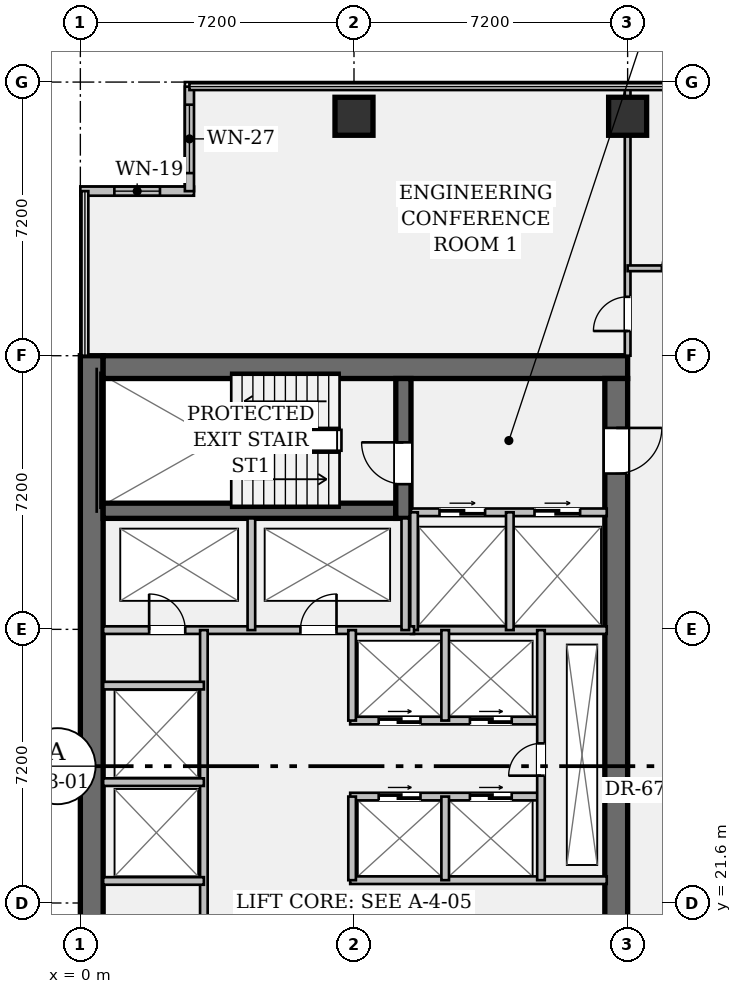
"""IFC4 building model, lengths in metres.
Left out: names, types, materials, properties, quantities, classifications, styles, units other than length and angle.
Written with IfcOpenShell. Run it as: python <this file> out.ifc"""

import sys

from ifc_helpers import new_model, si_unit, direction, frame, frame_2d, origin, origin_2d, place, context, subcontext, project, spatial, rectangle, hollow_rectangle, extrude, element, fill, save


model = new_model("IFC4")
c1 = context("Model", 3, precision=1e-05, world=origin(), true_north=direction((0.0, 1.0)))
c2 = subcontext(c1, "Body", "Model", "MODEL_VIEW")
j1 = project(units=[si_unit("LENGTHUNIT", "METRE"), si_unit("PLANEANGLEUNIT", "RADIAN")], contexts=[c1])
p1 = place(None, origin())
s1 = spatial("IfcSite", under=j1, at=p1, CompositionType="ELEMENT")
p2 = place(p1, origin())
s2 = spatial("IfcBuilding", under=s1, at=p2, CompositionType="ELEMENT")
p3 = place(p2, frame((0.0, 0.0, 73.5)))
s3 = spatial("IfcBuildingStorey", under=s2, at=p3, CompositionType="ELEMENT", Elevation=73.5)
p4 = place(p3, frame((0.3, 7.2, 0.0), z_axis=(0.0, 0.0, 1.0), x_axis=(0.0, 1.0, 0.0)))
e1 = element("IfcWall", 1, at=p4, inside=s3, PredefinedType="SHEAR", context=c2, shape_type="SweptSolid", body=[
    extrude(rectangle(XDim=28.8, YDim=0.6, at=frame_2d((14.4, 0.0))), origin(), (0.0, 0.0, 1.0), 3.57),
])
p5 = place(p3, frame((0.6, 35.7, 0.0), z_axis=(0.0, 0.0, 1.0), x_axis=(1.0, 0.0, 0.0)))
e2 = element("IfcWall", 2, at=p5, inside=s3, PredefinedType="SHEAR", context=c2, shape_type="SweptSolid", body=[
    extrude(rectangle(XDim=13.8, YDim=0.6, at=frame_2d((6.9, 0.0))), origin(), (0.0, 0.0, 1.0), 3.57),
])
p6 = place(p3, frame((14.1, 35.4, 0.0), z_axis=(0.0, 0.0, 1.0), x_axis=(0.0, -1.0, 0.0)))
e3 = element("IfcWall", 3, at=p6, inside=s3, PredefinedType="SHEAR", context=c2, shape_type="SweptSolid", body=[
    extrude(rectangle(XDim=27.6, YDim=0.6, at=frame_2d((13.8, 0.0))), origin(), (0.0, 0.0, 1.0), 3.57),
])
p7 = place(p6, frame((1.3, 0.0, 0.0)))
e4 = element("IfcOpeningElement", 4, at=p7, cuts=e3, PredefinedType="OPENING", context=c2, shape_type="SweptSolid", body=[
    extrude(rectangle(XDim=1.2, YDim=2.15, at=frame_2d((0.6, 1.075))), frame((0.0, 0.312, 0.0), z_axis=(0.0, -1.0, 0.0), x_axis=(1.0, 0.0, 0.0)), (0.0, 0.0, 1.0), 0.624),
])
p8 = place(p6, frame((25.25, 0.0, 0.0)))
e5 = element("IfcOpeningElement", 5, at=p8, cuts=e3, PredefinedType="OPENING", context=c2, shape_type="SweptSolid", body=[
    extrude(rectangle(XDim=1.2, YDim=2.15, at=frame_2d((0.6, 1.075))), frame((0.0, 0.312, 0.0), z_axis=(0.0, -1.0, 0.0), x_axis=(1.0, 0.0, 0.0)), (0.0, 0.0, 1.0), 0.624),
])
p9 = place(p6, frame((14.6, 0.0, 0.0)))
e6 = element("IfcOpeningElement", 6, at=p9, cuts=e3, PredefinedType="OPENING", context=c2, shape_type="SweptSolid", body=[
    extrude(rectangle(XDim=1.6, YDim=2.2, at=frame_2d((0.8, 1.1))), frame((0.0, 0.312, 0.0), z_axis=(0.0, -1.0, 0.0), x_axis=(1.0, 0.0, 0.0)), (0.0, 0.0, 1.0), 0.624),
])
p10 = place(p3, frame((0.6, 31.92, 0.0), z_axis=(0.0, 0.0, 1.0), x_axis=(1.0, 0.0, 0.0)))
e7 = element("IfcWall", 7, at=p10, inside=s3, PredefinedType="SHEAR", context=c2, shape_type="SweptSolid", body=[
    extrude(rectangle(XDim=7.7, YDim=0.4, at=frame_2d((3.85, 0.0))), origin(), (0.0, 0.0, 1.0), 3.57),
])
p11 = place(p3, frame((8.5, 31.72, 0.0), z_axis=(0.0, 0.0, 1.0), x_axis=(0.0, 1.0, 0.0)))
e8 = element("IfcWall", 8, at=p11, inside=s3, PredefinedType="SHEAR", context=c2, shape_type="SweptSolid", body=[
    extrude(rectangle(XDim=3.68, YDim=0.4, at=frame_2d((1.84, 0.0))), origin(), (0.0, 0.0, 1.0), 3.57),
])
p12 = place(p11, frame((0.9, 0.0, 0.0)))
e9 = element("IfcOpeningElement", 9, at=p12, cuts=e8, PredefinedType="OPENING", context=c2, shape_type="SweptSolid", body=[
    extrude(rectangle(XDim=1.1, YDim=2.15, at=frame_2d((0.55, 1.075))), frame((0.0, 0.212, 0.0), z_axis=(0.0, -1.0, 0.0), x_axis=(1.0, 0.0, 0.0)), (0.0, 0.0, 1.0), 0.424),
])
for number, where, z_axis, x_axis in (
    (10, (7.2, 42.3, 0.0), (0.0, 0.0, 1.0), (1.0, 0.0, 0.0)),
    (11, (14.4, 42.3, 0.0), (0.0, 0.0, 1.0), (1.0, 0.0, 0.0)),
):
    element("IfcColumn", number, at=place(p3, frame(where, z_axis=z_axis, x_axis=x_axis)), inside=s3, PredefinedType="COLUMN", context=c2, shape_type="SweptSolid", body=[
        extrude(hollow_rectangle(XDim=1.0, YDim=1.0, WallThickness=0.065, at=origin_2d()), origin(), (0.0, 0.0, 1.0), 3.57),
    ])
p13 = place(p3, frame((0.0, 40.33, 0.0), z_axis=(0.0, 0.0, 1.0), x_axis=(1.0, 0.0, 0.0)))
e12 = element("IfcWall", 12, at=p13, inside=s3, PredefinedType="STANDARD", context=c2, shape_type="SweptSolid", body=[
    extrude(rectangle(XDim=2.99, YDim=0.24, at=frame_2d((1.495, 0.0))), origin(), (0.0, 0.0, 1.0), 3.57),
])
p14 = place(p13, frame((0.895, 0.0, 0.95)))
e13 = element("IfcOpeningElement", 13, at=p14, cuts=e12, PredefinedType="OPENING", context=c2, shape_type="SweptSolid", body=[
    extrude(rectangle(XDim=1.2, YDim=1.8, at=frame_2d((0.6, 0.9))), frame((0.0, 0.132, 0.0), z_axis=(0.0, -1.0, 0.0), x_axis=(1.0, 0.0, 0.0)), (0.0, 0.0, 1.0), 0.264),
])
p15 = place(p3, frame((2.87, 40.33, 0.0), z_axis=(0.0, 0.0, 1.0), x_axis=(0.0, 1.0, 0.0)))
e14 = element("IfcWall", 14, at=p15, inside=s3, PredefinedType="STANDARD", context=c2, shape_type="SweptSolid", body=[
    extrude(rectangle(XDim=2.75, YDim=0.24, at=frame_2d((1.375, 0.0))), origin(), (0.0, 0.0, 1.0), 3.57),
])
p16 = place(p15, frame((0.475, 0.0, 0.95)))
e15 = element("IfcOpeningElement", 15, at=p16, cuts=e14, PredefinedType="OPENING", context=c2, shape_type="SweptSolid", body=[
    extrude(rectangle(XDim=1.8, YDim=1.35, at=frame_2d((0.9, 0.675))), frame((0.0, 0.132, 0.0), z_axis=(0.0, -1.0, 0.0), x_axis=(1.0, 0.0, 0.0)), (0.0, 0.0, 1.0), 0.264),
])
p17 = place(p3, frame((8.7, 31.88, 0.0), z_axis=(0.0, 0.0, 1.0), x_axis=(1.0, 0.0, 0.0)))
e16 = element("IfcWall", 16, at=p17, inside=s3, PredefinedType="PARTITIONING", context=c2, shape_type="SweptSolid", body=[
    extrude(rectangle(XDim=5.15, YDim=0.2, at=frame_2d((2.575, 0.0))), origin(), (0.0, 0.0, 1.0), 3.57),
])
p18 = place(p17, frame((0.75, 0.0, 0.0)))
e17 = element("IfcOpeningElement", 17, at=p18, cuts=e16, PredefinedType="OPENING", context=c2, shape_type="SweptSolid", body=[
    extrude(rectangle(XDim=1.2, YDim=2.2, at=frame_2d((0.6, 1.1))), frame((0.0, 0.112, 0.0), z_axis=(0.0, -1.0, 0.0), x_axis=(1.0, 0.0, 0.0)), (0.0, 0.0, 1.0), 0.224),
])
p19 = place(p17, frame((3.25, 0.0, 0.0)))
e18 = element("IfcOpeningElement", 18, at=p19, cuts=e16, PredefinedType="OPENING", context=c2, shape_type="SweptSolid", body=[
    extrude(rectangle(XDim=1.2, YDim=2.2, at=frame_2d((0.6, 1.1))), frame((0.0, 0.112, 0.0), z_axis=(0.0, -1.0, 0.0), x_axis=(1.0, 0.0, 0.0)), (0.0, 0.0, 1.0), 0.224),
])
p20 = place(p3, frame((8.7, 28.78, 0.0), z_axis=(0.0, 0.0, 1.0), x_axis=(1.0, 0.0, 0.0)))
e19 = element("IfcWall", 19, at=p20, inside=s3, PredefinedType="PARTITIONING", context=c2, shape_type="SweptSolid", body=[
    extrude(rectangle(XDim=5.15, YDim=0.2, at=frame_2d((2.575, 0.0))), origin(), (0.0, 0.0, 1.0), 3.57),
])
for number, where, z_axis, x_axis in (
    (20, (8.78, 28.78, 0.0), (0.0, 0.0, 1.0), (0.0, 1.0, 0.0)),
    (21, (11.3, 28.78, 0.0), (0.0, 0.0, 1.0), (0.0, 1.0, 0.0)),
):
    element("IfcWall", number, at=place(p3, frame(where, z_axis=z_axis, x_axis=x_axis)), inside=s3, PredefinedType="PARTITIONING", context=c2, shape_type="SweptSolid", body=[
        extrude(rectangle(XDim=3.1, YDim=0.2, at=frame_2d((1.55, 0.0))), origin(), (0.0, 0.0, 1.0), 3.57),
    ])
p21 = place(p3, frame((0.6, 28.78, 0.0), z_axis=(0.0, 0.0, 1.0), x_axis=(1.0, 0.0, 0.0)))
e22 = element("IfcWall", 22, at=p21, inside=s3, PredefinedType="PARTITIONING", context=c2, shape_type="SweptSolid", body=[
    extrude(rectangle(XDim=8.18, YDim=0.2, at=frame_2d((4.09, 0.0))), origin(), (0.0, 0.0, 1.0), 3.57),
])
p22 = place(p21, frame((1.21, 0.0, 0.0)))
e23 = element("IfcOpeningElement", 23, at=p22, cuts=e22, PredefinedType="OPENING", context=c2, shape_type="SweptSolid", body=[
    extrude(rectangle(XDim=0.95, YDim=2.15, at=frame_2d((0.475, 1.075))), frame((0.0, 0.112, 0.0), z_axis=(0.0, -1.0, 0.0), x_axis=(1.0, 0.0, 0.0)), (0.0, 0.0, 1.0), 0.224),
])
p23 = place(p21, frame((5.19, 0.0, 0.0)))
e24 = element("IfcOpeningElement", 24, at=p23, cuts=e22, PredefinedType="OPENING", context=c2, shape_type="SweptSolid", body=[
    extrude(rectangle(XDim=0.95, YDim=2.15, at=frame_2d((0.475, 1.075))), frame((0.0, 0.112, 0.0), z_axis=(0.0, -1.0, 0.0), x_axis=(1.0, 0.0, 0.0)), (0.0, 0.0, 1.0), 0.224),
])
for number, where, z_axis, x_axis in (
    (25, (4.5, 28.78, 0.0), (0.0, 0.0, 1.0), (0.0, 1.0, 0.0)),
    (26, (8.55, 28.78, 0.0), (0.0, 0.0, 1.0), (0.0, 1.0, 0.0)),
):
    element("IfcWall", number, at=place(p3, frame(where, z_axis=z_axis, x_axis=x_axis)), inside=s3, PredefinedType="PARTITIONING", context=c2, shape_type="SweptSolid", body=[
        extrude(rectangle(XDim=2.94, YDim=0.2, at=frame_2d((1.47, 0.0))), origin(), (0.0, 0.0, 1.0), 3.57),
    ])
p24 = place(p3, frame((3.25, 15.7, 0.0), z_axis=(0.0, 0.0, 1.0), x_axis=(0.0, 1.0, 0.0)))
e27 = element("IfcWall", 27, at=p24, inside=s3, PredefinedType="PARTITIONING", context=c2, shape_type="SweptSolid", body=[
    extrude(rectangle(XDim=13.08, YDim=0.2, at=frame_2d((6.54, 0.0))), origin(), (0.0, 0.0, 1.0), 3.57),
])
for number, where, z_axis, x_axis in (
    (28, (0.6, 22.18, 0.0), (0.0, 0.0, 1.0), (1.0, 0.0, 0.0)),
    (29, (0.6, 24.78, 0.0), (0.0, 0.0, 1.0), (1.0, 0.0, 0.0)),
    (30, (0.6, 27.32, 0.0), (0.0, 0.0, 1.0), (1.0, 0.0, 0.0)),
):
    element("IfcWall", number, at=place(p3, frame(where, z_axis=z_axis, x_axis=x_axis)), inside=s3, PredefinedType="PARTITIONING", context=c2, shape_type="SweptSolid", body=[
        extrude(rectangle(XDim=2.65, YDim=0.2, at=frame_2d((1.325, 0.0))), origin(), (0.0, 0.0, 1.0), 3.57),
    ])
p25 = place(p3, frame((7.1, 22.2, 0.0), z_axis=(0.0, 0.0, 1.0), x_axis=(1.0, 0.0, 0.0)))
e31 = element("IfcWall", 31, at=p25, inside=s3, PredefinedType="PARTITIONING", context=c2, shape_type="SweptSolid", body=[
    extrude(rectangle(XDim=6.75, YDim=0.2, at=frame_2d((3.375, 0.0))), origin(), (0.0, 0.0, 1.0), 3.57),
])
p26 = place(p3, frame((7.1, 24.4, 0.0), z_axis=(0.0, 0.0, 1.0), x_axis=(1.0, 0.0, 0.0)))
e32 = element("IfcWall", 32, at=p26, inside=s3, PredefinedType="PARTITIONING", context=c2, shape_type="SweptSolid", body=[
    extrude(rectangle(XDim=5.02, YDim=0.2, at=frame_2d((2.51, 0.0))), origin(), (0.0, 0.0, 1.0), 3.57),
])
p27 = place(p26, frame((0.75, 0.0, 0.0)))
e33 = element("IfcOpeningElement", 33, at=p27, cuts=e32, PredefinedType="OPENING", context=c2, shape_type="SweptSolid", body=[
    extrude(rectangle(XDim=1.1, YDim=2.2, at=frame_2d((0.55, 1.1))), frame((0.0, 0.112, 0.0), z_axis=(0.0, -1.0, 0.0), x_axis=(1.0, 0.0, 0.0)), (0.0, 0.0, 1.0), 0.224),
])
p28 = place(p26, frame((3.15, 0.0, 0.0)))
e34 = element("IfcOpeningElement", 34, at=p28, cuts=e32, PredefinedType="OPENING", context=c2, shape_type="SweptSolid", body=[
    extrude(rectangle(XDim=1.1, YDim=2.2, at=frame_2d((0.55, 1.1))), frame((0.0, 0.112, 0.0), z_axis=(0.0, -1.0, 0.0), x_axis=(1.0, 0.0, 0.0)), (0.0, 0.0, 1.0), 0.224),
])
p29 = place(p3, frame((7.1, 26.4, 0.0), z_axis=(0.0, 0.0, 1.0), x_axis=(1.0, 0.0, 0.0)))
e35 = element("IfcWall", 35, at=p29, inside=s3, PredefinedType="PARTITIONING", context=c2, shape_type="SweptSolid", body=[
    extrude(rectangle(XDim=5.02, YDim=0.2, at=frame_2d((2.51, 0.0))), origin(), (0.0, 0.0, 1.0), 3.57),
])
p30 = place(p29, frame((0.75, 0.0, 0.0)))
e36 = element("IfcOpeningElement", 36, at=p30, cuts=e35, PredefinedType="OPENING", context=c2, shape_type="SweptSolid", body=[
    extrude(rectangle(XDim=1.1, YDim=2.2, at=frame_2d((0.55, 1.1))), frame((0.0, 0.112, 0.0), z_axis=(0.0, -1.0, 0.0), x_axis=(1.0, 0.0, 0.0)), (0.0, 0.0, 1.0), 0.224),
])
p31 = place(p29, frame((3.15, 0.0, 0.0)))
e37 = element("IfcOpeningElement", 37, at=p31, cuts=e35, PredefinedType="OPENING", context=c2, shape_type="SweptSolid", body=[
    extrude(rectangle(XDim=1.1, YDim=2.2, at=frame_2d((0.55, 1.1))), frame((0.0, 0.112, 0.0), z_axis=(0.0, -1.0, 0.0), x_axis=(1.0, 0.0, 0.0)), (0.0, 0.0, 1.0), 0.224),
])
p32 = place(p3, frame((7.15, 22.2, 0.0), z_axis=(0.0, 0.0, 1.0), x_axis=(0.0, 1.0, 0.0)))
e38 = element("IfcWall", 38, at=p32, inside=s3, PredefinedType="PARTITIONING", context=c2, shape_type="SweptSolid", body=[
    extrude(rectangle(XDim=2.2, YDim=0.2, at=frame_2d((1.1, 0.0))), origin(), (0.0, 0.0, 1.0), 3.57),
])
p33 = place(p3, frame((7.15, 26.4, 0.0), z_axis=(0.0, 0.0, 1.0), x_axis=(0.0, 1.0, 0.0)))
e39 = element("IfcWall", 39, at=p33, inside=s3, PredefinedType="PARTITIONING", context=c2, shape_type="SweptSolid", body=[
    extrude(rectangle(XDim=2.38, YDim=0.2, at=frame_2d((1.19, 0.0))), origin(), (0.0, 0.0, 1.0), 3.57),
])
p34 = place(p3, frame((9.6, 22.2, 0.0), z_axis=(0.0, 0.0, 1.0), x_axis=(0.0, 1.0, 0.0)))
e40 = element("IfcWall", 40, at=p34, inside=s3, PredefinedType="PARTITIONING", context=c2, shape_type="SweptSolid", body=[
    extrude(rectangle(XDim=2.2, YDim=0.2, at=frame_2d((1.1, 0.0))), origin(), (0.0, 0.0, 1.0), 3.57),
])
p35 = place(p3, frame((9.6, 26.4, 0.0), z_axis=(0.0, 0.0, 1.0), x_axis=(0.0, 1.0, 0.0)))
e41 = element("IfcWall", 41, at=p35, inside=s3, PredefinedType="PARTITIONING", context=c2, shape_type="SweptSolid", body=[
    extrude(rectangle(XDim=2.38, YDim=0.2, at=frame_2d((1.19, 0.0))), origin(), (0.0, 0.0, 1.0), 3.57),
])
p36 = place(p3, frame((12.12, 22.2, 0.0), z_axis=(0.0, 0.0, 1.0), x_axis=(0.0, 1.0, 0.0)))
e42 = element("IfcWall", 42, at=p36, inside=s3, PredefinedType="PARTITIONING", context=c2, shape_type="SweptSolid", body=[
    extrude(rectangle(XDim=6.58, YDim=0.2, at=frame_2d((3.29, 0.0))), origin(), (0.0, 0.0, 1.0), 3.57),
])
p37 = place(p36, frame((2.75, 0.0, 0.0)))
e43 = element("IfcOpeningElement", 43, at=p37, cuts=e42, PredefinedType="OPENING", context=c2, shape_type="SweptSolid", body=[
    extrude(rectangle(XDim=0.85, YDim=2.15, at=frame_2d((0.425, 1.075))), frame((0.0, 0.112, 0.0), z_axis=(0.0, -1.0, 0.0), x_axis=(1.0, 0.0, 0.0)), (0.0, 0.0, 1.0), 0.224),
])
p38 = place(p3, frame((14.4, 36.0, 0.0), z_axis=(0.0, 0.0, 1.0), x_axis=(0.0, 1.0, 0.0)))
e44 = element("IfcWall", 44, at=p38, inside=s3, PredefinedType="PARTITIONING", context=c2, shape_type="SweptSolid", body=[
    extrude(rectangle(XDim=7.08, YDim=0.15, at=frame_2d((3.54, 0.0))), origin(), (0.0, 0.0, 1.0), 2.783),
])
p39 = place(p38, frame((0.65, 0.0, 0.0)))
e45 = element("IfcOpeningElement", 45, at=p39, cuts=e44, PredefinedType="OPENING", context=c2, shape_type="SweptSolid", body=[
    extrude(rectangle(XDim=0.9, YDim=2.15, at=frame_2d((0.45, 1.075))), frame((0.0, 0.087, 0.0), z_axis=(0.0, -1.0, 0.0), x_axis=(1.0, 0.0, 0.0)), (0.0, 0.0, 1.0), 0.174),
])
p40 = place(p3, frame((14.4, 38.3, 0.0), z_axis=(0.0, 0.0, 1.0), x_axis=(1.0, 0.0, 0.0)))
e46 = element("IfcWall", 46, at=p40, inside=s3, PredefinedType="PARTITIONING", context=c2, shape_type="SweptSolid", body=[
    extrude(rectangle(XDim=2.95, YDim=0.15, at=frame_2d((1.475, 0.0))), origin(), (0.0, 0.0, 1.0), 2.783),
])
p41 = place(p40, frame((0.9, 0.0, 0.0)))
e47 = element("IfcOpeningElement", 47, at=p41, cuts=e46, PredefinedType="OPENING", context=c2, shape_type="SweptSolid", body=[
    extrude(rectangle(XDim=0.95, YDim=2.15, at=frame_2d((0.475, 1.075))), frame((0.0, 0.087, 0.0), z_axis=(0.0, -1.0, 0.0), x_axis=(1.0, 0.0, 0.0)), (0.0, 0.0, 1.0), 0.174),
])
p42 = place(p14, origin())
e48 = element("IfcWindow", 48, at=p42, inside=s3, PartitioningType="SINGLE_PANEL", PredefinedType="WINDOW", context=c2, shape_type="SweptSolid", body=[
    extrude(rectangle(XDim=1.2, YDim=1.8, at=frame_2d((0.6, 0.9))), frame((0.0, 0.03, 0.0), z_axis=(0.0, -1.0, 0.0), x_axis=(1.0, 0.0, 0.0)), (0.0, 0.0, 1.0), 0.06),
])
fill(e13, e48)
p43 = place(p16, origin())
e49 = element("IfcWindow", 49, at=p43, inside=s3, PartitioningType="SINGLE_PANEL", PredefinedType="WINDOW", context=c2, shape_type="SweptSolid", body=[
    extrude(rectangle(XDim=1.8, YDim=1.35, at=frame_2d((0.9, 0.675))), frame((0.0, 0.03, 0.0), z_axis=(0.0, -1.0, 0.0), x_axis=(1.0, 0.0, 0.0)), (0.0, 0.0, 1.0), 0.06),
])
fill(e15, e49)
p44 = place(p12, origin())
e50 = element("IfcDoor", 50, at=p44, inside=s3, OperationType="SINGLE_SWING_RIGHT", PredefinedType="DOOR", context=c2, shape_type="SweptSolid", body=[
    extrude(rectangle(XDim=1.1, YDim=2.15, at=frame_2d((0.55, 1.075))), frame((0.0, 0.025, 0.0), z_axis=(0.0, -1.0, 0.0), x_axis=(1.0, 0.0, 0.0)), (0.0, 0.0, 1.0), 0.05),
])
fill(e9, e50)
p45 = place(p7, origin())
e51 = element("IfcDoor", 51, at=p45, inside=s3, OperationType="SINGLE_SWING_LEFT", PredefinedType="DOOR", context=c2, shape_type="SweptSolid", body=[
    extrude(rectangle(XDim=1.2, YDim=2.15, at=frame_2d((0.6, 1.075))), frame((0.0, 0.025, 0.0), z_axis=(0.0, -1.0, 0.0), x_axis=(1.0, 0.0, 0.0)), (0.0, 0.0, 1.0), 0.05),
])
fill(e4, e51)
p46 = place(p18, origin())
e52 = element("IfcDoor", 52, at=p46, inside=s3, OperationType="DOUBLE_DOOR_SLIDING", PredefinedType="DOOR", context=c2, shape_type="SweptSolid", body=[
    extrude(rectangle(XDim=1.2, YDim=2.2, at=frame_2d((0.6, 1.1))), frame((0.0, 0.025, 0.0), z_axis=(0.0, -1.0, 0.0), x_axis=(1.0, 0.0, 0.0)), (0.0, 0.0, 1.0), 0.05),
])
fill(e17, e52)
p47 = place(p19, origin())
e53 = element("IfcDoor", 53, at=p47, inside=s3, OperationType="DOUBLE_DOOR_SLIDING", PredefinedType="DOOR", context=c2, shape_type="SweptSolid", body=[
    extrude(rectangle(XDim=1.2, YDim=2.2, at=frame_2d((0.6, 1.1))), frame((0.0, 0.025, 0.0), z_axis=(0.0, -1.0, 0.0), x_axis=(1.0, 0.0, 0.0)), (0.0, 0.0, 1.0), 0.05),
])
fill(e18, e53)
p48 = place(p22, origin())
e54 = element("IfcDoor", 54, at=p48, inside=s3, OperationType="SINGLE_SWING_LEFT", PredefinedType="DOOR", context=c2, shape_type="SweptSolid", body=[
    extrude(rectangle(XDim=0.95, YDim=2.15, at=frame_2d((0.475, 1.075))), frame((0.0, 0.025, 0.0), z_axis=(0.0, -1.0, 0.0), x_axis=(1.0, 0.0, 0.0)), (0.0, 0.0, 1.0), 0.05),
])
fill(e23, e54)
p49 = place(p23, origin())
e55 = element("IfcDoor", 55, at=p49, inside=s3, OperationType="SINGLE_SWING_RIGHT", PredefinedType="DOOR", context=c2, shape_type="SweptSolid", body=[
    extrude(rectangle(XDim=0.95, YDim=2.15, at=frame_2d((0.475, 1.075))), frame((0.0, 0.025, 0.0), z_axis=(0.0, -1.0, 0.0), x_axis=(1.0, 0.0, 0.0)), (0.0, 0.0, 1.0), 0.05),
])
fill(e24, e55)
p50 = place(p37, origin())
e56 = element("IfcDoor", 56, at=p50, inside=s3, OperationType="SINGLE_SWING_LEFT", PredefinedType="DOOR", context=c2, shape_type="SweptSolid", body=[
    extrude(rectangle(XDim=0.85, YDim=2.15, at=frame_2d((0.425, 1.075))), frame((0.0, 0.025, 0.0), z_axis=(0.0, -1.0, 0.0), x_axis=(1.0, 0.0, 0.0)), (0.0, 0.0, 1.0), 0.05),
])
fill(e43, e56)
p51 = place(p27, origin())
e57 = element("IfcDoor", 57, at=p51, inside=s3, OperationType="DOUBLE_DOOR_SLIDING", PredefinedType="DOOR", context=c2, shape_type="SweptSolid", body=[
    extrude(rectangle(XDim=1.1, YDim=2.2, at=frame_2d((0.55, 1.1))), frame((0.0, 0.025, 0.0), z_axis=(0.0, -1.0, 0.0), x_axis=(1.0, 0.0, 0.0)), (0.0, 0.0, 1.0), 0.05),
])
fill(e33, e57)
p52 = place(p28, origin())
e58 = element("IfcDoor", 58, at=p52, inside=s3, OperationType="DOUBLE_DOOR_SLIDING", PredefinedType="DOOR", context=c2, shape_type="SweptSolid", body=[
    extrude(rectangle(XDim=1.1, YDim=2.2, at=frame_2d((0.55, 1.1))), frame((0.0, 0.025, 0.0), z_axis=(0.0, -1.0, 0.0), x_axis=(1.0, 0.0, 0.0)), (0.0, 0.0, 1.0), 0.05),
])
fill(e34, e58)
p53 = place(p30, origin())
e59 = element("IfcDoor", 59, at=p53, inside=s3, OperationType="DOUBLE_DOOR_SLIDING", PredefinedType="DOOR", context=c2, shape_type="SweptSolid", body=[
    extrude(rectangle(XDim=1.1, YDim=2.2, at=frame_2d((0.55, 1.1))), frame((0.0, 0.025, 0.0), z_axis=(0.0, -1.0, 0.0), x_axis=(1.0, 0.0, 0.0)), (0.0, 0.0, 1.0), 0.05),
])
fill(e36, e59)
p54 = place(p31, origin())
e60 = element("IfcDoor", 60, at=p54, inside=s3, OperationType="DOUBLE_DOOR_SLIDING", PredefinedType="DOOR", context=c2, shape_type="SweptSolid", body=[
    extrude(rectangle(XDim=1.1, YDim=2.2, at=frame_2d((0.55, 1.1))), frame((0.0, 0.025, 0.0), z_axis=(0.0, -1.0, 0.0), x_axis=(1.0, 0.0, 0.0)), (0.0, 0.0, 1.0), 0.05),
])
fill(e37, e60)
p55 = place(p39, origin())
e61 = element("IfcDoor", 61, at=p55, inside=s3, OperationType="SINGLE_SWING_LEFT", PredefinedType="DOOR", context=c2, shape_type="SweptSolid", body=[
    extrude(rectangle(XDim=0.9, YDim=2.15, at=frame_2d((0.45, 1.075))), frame((0.0, 0.025, 0.0), z_axis=(0.0, -1.0, 0.0), x_axis=(1.0, 0.0, 0.0)), (0.0, 0.0, 1.0), 0.05),
])
fill(e45, e61)
p56 = place(p41, origin())
e62 = element("IfcDoor", 62, at=p56, inside=s3, OperationType="SINGLE_SWING_RIGHT", PredefinedType="DOOR", context=c2, shape_type="SweptSolid", body=[
    extrude(rectangle(XDim=0.95, YDim=2.15, at=frame_2d((0.475, 1.075))), frame((0.0, 0.025, 0.0), z_axis=(0.0, -1.0, 0.0), x_axis=(1.0, 0.0, 0.0)), (0.0, 0.0, 1.0), 0.05),
])
fill(e47, e62)
save(model, sys.argv[1])
